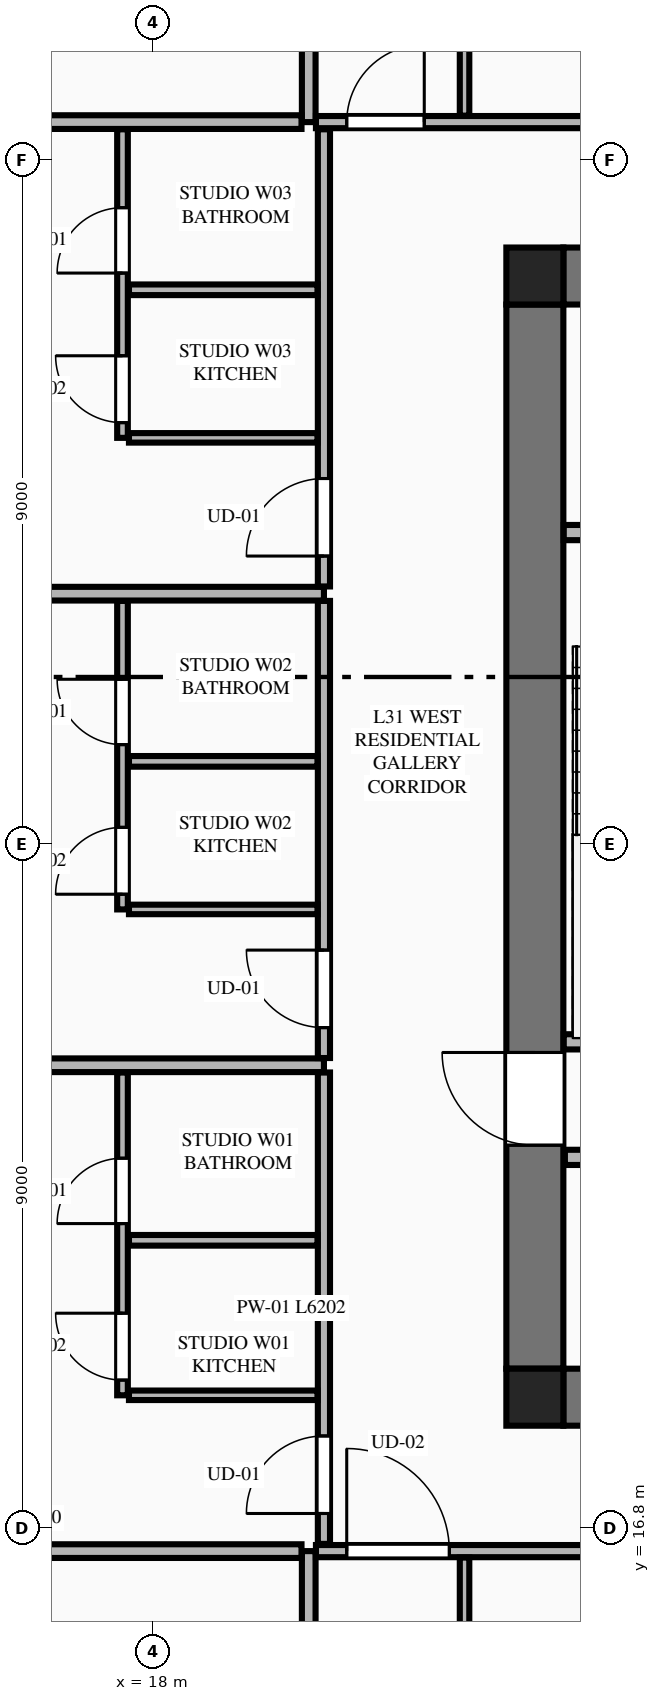
"""IFC4 building model, lengths in metres.
Left out: names, types, materials, properties, quantities, classifications, styles, units other than length and angle.
Written with IfcOpenShell. Run it as: python <this file> out.ifc"""

import sys

from ifc_helpers import new_model, si_unit, direction, frame, frame_2d, origin, origin_2d, place, context, subcontext, project, spatial, rectangle, extrude, element, fill, save


model = new_model("IFC4")
c1 = context("Model", 3, precision=1e-05, world=origin(), true_north=direction((0.0, 1.0)))
c2 = subcontext(c1, "Body", "Model", "MODEL_VIEW")
j1 = project(units=[si_unit("LENGTHUNIT", "METRE"), si_unit("PLANEANGLEUNIT", "RADIAN")], contexts=[c1])
p1 = place(None, origin())
s1 = spatial("IfcSite", under=j1, at=p1, CompositionType="ELEMENT")
p2 = place(p1, origin())
s2 = spatial("IfcBuilding", under=s1, at=p2, CompositionType="ELEMENT")
p3 = place(p2, frame((0.0, 0.0, 119.7)))
s3 = spatial("IfcBuildingStorey", under=s2, at=p3, CompositionType="ELEMENT", Elevation=119.7)
for number, where, z_axis, x_axis in (
    (1, (23.025, 18.525, 0.0), (0.0, 0.0, 1.0), (1.0, 0.0, 0.0)),
    (2, (23.025, 33.275, 0.0), (0.0, 0.0, 1.0), (1.0, 0.0, 0.0)),
):
    element("IfcColumn", number, at=place(p3, frame(where, z_axis=z_axis, x_axis=x_axis)), inside=s3, PredefinedType="COLUMN", context=c2, shape_type="SweptSolid", body=[
        extrude(rectangle(XDim=0.75, YDim=0.75, at=origin_2d()), origin(), (0.0, 0.0, 1.0), 3.55),
    ])
for number, where, z_axis, x_axis in (
    (3, (23.4, 18.525, 0.0), (0.0, 0.0, 1.0), (1.0, 0.0, 0.0)),
    (4, (23.4, 33.275, 0.0), (0.0, 0.0, 1.0), (1.0, 0.0, 0.0)),
):
    element("IfcWall", number, at=place(p3, frame(where, z_axis=z_axis, x_axis=x_axis)), inside=s3, PredefinedType="SHEAR", context=c2, shape_type="SweptSolid", body=[
        extrude(rectangle(XDim=18.0, YDim=0.75, at=frame_2d((9.0, 0.0))), origin(), (0.0, 0.0, 1.0), 3.34),
    ])
p4 = place(p3, frame((23.025, 18.9, 0.0), z_axis=(0.0, 0.0, 1.0), x_axis=(0.0, 1.0, 0.0)))
e5 = element("IfcWall", 5, at=p4, inside=s3, PredefinedType="SHEAR", context=c2, shape_type="SweptSolid", body=[
    extrude(rectangle(XDim=14.0, YDim=0.75, at=frame_2d((7.0, 0.0))), origin(), (0.0, 0.0, 1.0), 3.34),
])
p5 = place(p4, frame((2.94, 0.0, 0.0)))
e6 = element("IfcOpeningElement", 6, at=p5, cuts=e5, PredefinedType="OPENING", context=c2, shape_type="SweptSolid", body=[
    extrude(rectangle(XDim=1.22, YDim=2.25, at=frame_2d((0.61, 1.125))), frame((0.0, 0.385, 0.0), z_axis=(0.0, -1.0, 0.0), x_axis=(1.0, 0.0, 0.0)), (0.0, 0.0, 1.0), 0.77),
])
p6 = place(p3, frame((23.405, 23.2, 0.0), z_axis=(0.0, 0.0, 1.0), x_axis=(1.0, 0.0, 0.0)))
e7 = element("IfcWall", 7, at=p6, inside=s3, PredefinedType="PLUMBINGWALL", context=c2, shape_type="SweptSolid", body=[
    extrude(rectangle(XDim=3.27, YDim=0.2, at=frame_2d((1.635, 0.0))), origin(), (0.0, 0.0, 1.0), 3.34),
])
p7 = place(p3, frame((23.405, 29.9, 0.0), z_axis=(0.0, 0.0, 1.0), x_axis=(1.0, 0.0, 0.0)))
e8 = element("IfcWall", 8, at=p7, inside=s3, PredefinedType="PLUMBINGWALL", context=c2, shape_type="SweptSolid", body=[
    extrude(rectangle(XDim=3.27, YDim=0.2, at=frame_2d((1.635, 0.0))), origin(), (0.0, 0.0, 1.0), 3.34),
])
p8 = place(p7, frame((1.85, 0.0, 0.0)))
e9 = element("IfcOpeningElement", 9, at=p8, cuts=e8, PredefinedType="OPENING", context=c2, shape_type="SweptSolid", body=[
    extrude(rectangle(XDim=0.85, YDim=2.05, at=frame_2d((0.425, 1.025))), frame((0.0, 0.11, 0.0), z_axis=(0.0, -1.0, 0.0), x_axis=(1.0, 0.0, 0.0)), (0.0, 0.0, 1.0), 0.22),
])
p9 = place(p3, frame((23.42, 21.68, 0.0), z_axis=(0.0, 0.0, 1.0), x_axis=(1.0, 0.0, 0.0)))
e10 = element("IfcWall", 10, at=p9, inside=s3, PredefinedType="PLUMBINGWALL", context=c2, shape_type="SweptSolid", body=[
    extrude(rectangle(XDim=17.96, YDim=0.2, at=frame_2d((8.98, 0.0))), origin(), (0.0, 0.0, 1.0), 3.34),
])
p10 = place(p9, frame((11.6, 0.0, 0.0)))
e11 = element("IfcOpeningElement", 11, at=p10, cuts=e10, PredefinedType="OPENING", context=c2, shape_type="SweptSolid", body=[
    extrude(rectangle(XDim=1.1, YDim=2.2, at=frame_2d((0.55, 1.1))), frame((0.0, 0.11, 0.0), z_axis=(0.0, -1.0, 0.0), x_axis=(1.0, 0.0, 0.0)), (0.0, 0.0, 1.0), 0.22),
])
p11 = place(p9, frame((0.41, 0.0, 0.0)))
e12 = element("IfcOpeningElement", 12, at=p11, cuts=e10, PredefinedType="OPENING", context=c2, shape_type="SweptSolid", body=[
    extrude(rectangle(XDim=0.85, YDim=2.05, at=frame_2d((0.425, 1.025))), frame((0.0, 0.11, 0.0), z_axis=(0.0, -1.0, 0.0), x_axis=(1.0, 0.0, 0.0)), (0.0, 0.0, 1.0), 0.22),
])
p12 = place(p9, frame((4.13, 0.0, 0.0)))
e13 = element("IfcOpeningElement", 13, at=p12, cuts=e10, PredefinedType="OPENING", context=c2, shape_type="SweptSolid", body=[
    extrude(rectangle(XDim=0.85, YDim=2.05, at=frame_2d((0.425, 1.025))), frame((0.0, 0.11, 0.0), z_axis=(0.0, -1.0, 0.0), x_axis=(1.0, 0.0, 0.0)), (0.0, 0.0, 1.0), 0.22),
])
p13 = place(p9, frame((7.83, 0.0, 0.0)))
e14 = element("IfcOpeningElement", 14, at=p13, cuts=e10, PredefinedType="OPENING", context=c2, shape_type="SweptSolid", body=[
    extrude(rectangle(XDim=0.85, YDim=2.05, at=frame_2d((0.425, 1.025))), frame((0.0, 0.11, 0.0), z_axis=(0.0, -1.0, 0.0), x_axis=(1.0, 0.0, 0.0)), (0.0, 0.0, 1.0), 0.22),
])
p14 = place(p9, frame((13.78, 0.0, 0.0)))
e15 = element("IfcOpeningElement", 15, at=p14, cuts=e10, PredefinedType="OPENING", context=c2, shape_type="SweptSolid", body=[
    extrude(rectangle(XDim=0.85, YDim=2.05, at=frame_2d((0.425, 1.025))), frame((0.0, 0.11, 0.0), z_axis=(0.0, -1.0, 0.0), x_axis=(1.0, 0.0, 0.0)), (0.0, 0.0, 1.0), 0.22),
])
p15 = place(p9, frame((16.13, 0.0, 0.0)))
e16 = element("IfcOpeningElement", 16, at=p15, cuts=e10, PredefinedType="OPENING", context=c2, shape_type="SweptSolid", body=[
    extrude(rectangle(XDim=0.85, YDim=2.05, at=frame_2d((0.425, 1.025))), frame((0.0, 0.11, 0.0), z_axis=(0.0, -1.0, 0.0), x_axis=(1.0, 0.0, 0.0)), (0.0, 0.0, 1.0), 0.22),
])
p16 = place(p3, frame((20.05, 4.105, 0.0), z_axis=(0.0, 0.0, 1.0), x_axis=(0.0, 1.0, 0.0)))
e17 = element("IfcWall", 17, at=p16, inside=s3, PredefinedType="PARTITIONING", context=c2, shape_type="SweptSolid", body=[
    extrude(rectangle(XDim=12.395, YDim=0.18, at=frame_2d((6.198, 0.0))), origin(), (0.0, 0.0, 1.0), 3.34),
])
p17 = place(p3, frame((20.145, 16.5, 0.0), z_axis=(0.0, 0.0, 1.0), x_axis=(1.0, 0.0, 0.0)))
e18 = element("IfcWall", 18, at=p17, inside=s3, PredefinedType="PARTITIONING", context=c2, shape_type="SweptSolid", body=[
    extrude(rectangle(XDim=24.51, YDim=0.16, at=frame_2d((12.255, 0.0))), origin(), (0.0, 0.0, 1.0), 3.34),
])
p18 = place(p17, frame((0.405, 0.0, 0.0)))
e19 = element("IfcOpeningElement", 19, at=p18, cuts=e18, PredefinedType="OPENING", context=c2, shape_type="SweptSolid", body=[
    extrude(rectangle(XDim=1.35, YDim=2.35, at=frame_2d((0.675, 1.175))), frame((0.0, 0.09, 0.0), z_axis=(0.0, -1.0, 0.0), x_axis=(1.0, 0.0, 0.0)), (0.0, 0.0, 1.0), 0.18),
])
p19 = place(p3, frame((22.1, 10.284, 0.0), z_axis=(0.0, 0.0, 1.0), x_axis=(0.0, 1.0, 0.0)))
e20 = element("IfcWall", 20, at=p19, inside=s3, PredefinedType="PARTITIONING", context=c2, shape_type="SweptSolid", body=[
    extrude(rectangle(XDim=6.131, YDim=0.125, at=frame_2d((3.065, 0.0))), origin(), (0.0, 0.0, 1.0), 2.722),
])
p20 = place(p3, frame((20.05, 35.3, 0.0), z_axis=(0.0, 0.0, 1.0), x_axis=(0.0, 1.0, 0.0)))
e21 = element("IfcWall", 21, at=p20, inside=s3, PredefinedType="PARTITIONING", context=c2, shape_type="SweptSolid", body=[
    extrude(rectangle(XDim=12.195, YDim=0.18, at=frame_2d((6.098, 0.0))), origin(), (0.0, 0.0, 1.0), 3.34),
])
p21 = place(p3, frame((20.145, 35.3, 0.0), z_axis=(0.0, 0.0, 1.0), x_axis=(1.0, 0.0, 0.0)))
e22 = element("IfcWall", 22, at=p21, inside=s3, PredefinedType="PARTITIONING", context=c2, shape_type="SweptSolid", body=[
    extrude(rectangle(XDim=24.51, YDim=0.16, at=frame_2d((12.255, 0.0))), origin(), (0.0, 0.0, 1.0), 3.34),
])
p22 = place(p21, frame((0.405, 0.0, 0.0)))
e23 = element("IfcOpeningElement", 23, at=p22, cuts=e22, PredefinedType="OPENING", context=c2, shape_type="SweptSolid", body=[
    extrude(rectangle(XDim=1.02, YDim=2.25, at=frame_2d((0.51, 1.125))), frame((0.0, 0.09, 0.0), z_axis=(0.0, -1.0, 0.0), x_axis=(1.0, 0.0, 0.0)), (0.0, 0.0, 1.0), 0.18),
])
p23 = place(p3, frame((22.1, 35.385, 0.0), z_axis=(0.0, 0.0, 1.0), x_axis=(0.0, 1.0, 0.0)))
e24 = element("IfcWall", 24, at=p23, inside=s3, PredefinedType="PARTITIONING", context=c2, shape_type="SweptSolid", body=[
    extrude(rectangle(XDim=3.956, YDim=0.125, at=frame_2d((1.978, 0.0))), origin(), (0.0, 0.0, 1.0), 2.722),
])
p24 = place(p3, frame((12.185, 16.5, 0.0), z_axis=(0.0, 0.0, 1.0), x_axis=(1.0, 0.0, 0.0)))
e25 = element("IfcWall", 25, at=p24, inside=s3, PredefinedType="PARTITIONING", context=c2, shape_type="SweptSolid", body=[
    extrude(rectangle(XDim=7.77, YDim=0.18, at=frame_2d((3.885, 0.0))), origin(), (0.0, 0.0, 1.0), 3.34),
])
p25 = place(p3, frame((12.286, 35.3, 0.0), z_axis=(0.0, 0.0, 1.0), x_axis=(1.0, 0.0, 0.0)))
e26 = element("IfcWall", 26, at=p25, inside=s3, PredefinedType="PARTITIONING", context=c2, shape_type="SweptSolid", body=[
    extrude(rectangle(XDim=7.669, YDim=0.18, at=frame_2d((3.834, 0.0))), origin(), (0.0, 0.0, 1.0), 3.34),
])
p26 = place(p3, frame((20.25, 16.595, 0.0), z_axis=(0.0, 0.0, 1.0), x_axis=(0.0, 1.0, 0.0)))
e27 = element("IfcWall", 27, at=p26, inside=s3, PredefinedType="PARTITIONING", context=c2, shape_type="SweptSolid", body=[
    extrude(rectangle(XDim=6.202, YDim=0.16, at=frame_2d((3.101, 0.0))), origin(), (0.0, 0.0, 1.0), 3.34),
])
p27 = place(p26, frame((0.4, 0.0, 0.0)))
e28 = element("IfcOpeningElement", 28, at=p27, cuts=e27, PredefinedType="OPENING", context=c2, shape_type="SweptSolid", body=[
    extrude(rectangle(XDim=1.02, YDim=2.25, at=frame_2d((0.51, 1.125))), frame((0.0, 0.09, 0.0), z_axis=(0.0, -1.0, 0.0), x_axis=(1.0, 0.0, 0.0)), (0.0, 0.0, 1.0), 0.18),
])
p28 = place(p3, frame((17.685, 18.55, 0.0), z_axis=(0.0, 0.0, 1.0), x_axis=(1.0, 0.0, 0.0)))
e29 = element("IfcWall", 29, at=p28, inside=s3, PredefinedType="PARTITIONING", context=c2, shape_type="SweptSolid", body=[
    extrude(rectangle(XDim=2.48, YDim=0.125, at=frame_2d((1.24, 0.0))), origin(), (0.0, 0.0, 1.0), 2.722),
])
p29 = place(p3, frame((17.6, 18.55, 0.0), z_axis=(0.0, 0.0, 1.0), x_axis=(0.0, 1.0, 0.0)))
e30 = element("IfcWall", 30, at=p29, inside=s3, PredefinedType="PLUMBINGWALL", context=c2, shape_type="SweptSolid", body=[
    extrude(rectangle(XDim=4.247, YDim=0.14, at=frame_2d((2.124, 0.0))), origin(), (0.0, 0.0, 1.0), 3.34),
])
p30 = place(p29, frame((2.259, 0.0, 0.0)))
e31 = element("IfcOpeningElement", 31, at=p30, cuts=e30, PredefinedType="OPENING", context=c2, shape_type="SweptSolid", body=[
    extrude(rectangle(XDim=0.86, YDim=2.1, at=frame_2d((0.43, 1.05))), frame((0.0, 0.08, 0.0), z_axis=(0.0, -1.0, 0.0), x_axis=(1.0, 0.0, 0.0)), (0.0, 0.0, 1.0), 0.16),
])
p31 = place(p29, frame((0.2, 0.0, 0.0)))
e32 = element("IfcOpeningElement", 32, at=p31, cuts=e30, PredefinedType="OPENING", context=c2, shape_type="SweptSolid", body=[
    extrude(rectangle(XDim=0.88, YDim=2.15, at=frame_2d((0.44, 1.075))), frame((0.0, 0.08, 0.0), z_axis=(0.0, -1.0, 0.0), x_axis=(1.0, 0.0, 0.0)), (0.0, 0.0, 1.0), 0.16),
])
p32 = place(p3, frame((17.685, 20.589, 0.0), z_axis=(0.0, 0.0, 1.0), x_axis=(1.0, 0.0, 0.0)))
e33 = element("IfcWall", 33, at=p32, inside=s3, PredefinedType="PLUMBINGWALL", context=c2, shape_type="SweptSolid", body=[
    extrude(rectangle(XDim=2.48, YDim=0.14, at=frame_2d((1.24, 0.0))), origin(), (0.0, 0.0, 1.0), 3.34),
])
p33 = place(p3, frame((8.951, 22.892, 0.0), z_axis=(0.0, 0.0, 1.0), x_axis=(1.0, 0.0, 0.0)))
e34 = element("IfcWall", 34, at=p33, inside=s3, PredefinedType="PARTITIONING", context=c2, shape_type="SweptSolid", body=[
    extrude(rectangle(XDim=11.299, YDim=0.18, at=frame_2d((5.649, 0.0))), origin(), (0.0, 0.0, 1.0), 3.34),
])
p34 = place(p3, frame((20.25, 22.987, 0.0), z_axis=(0.0, 0.0, 1.0), x_axis=(0.0, 1.0, 0.0)))
e35 = element("IfcWall", 35, at=p34, inside=s3, PredefinedType="PARTITIONING", context=c2, shape_type="SweptSolid", body=[
    extrude(rectangle(XDim=6.014, YDim=0.16, at=frame_2d((3.007, 0.0))), origin(), (0.0, 0.0, 1.0), 3.34),
])
p35 = place(p34, frame((0.4, 0.0, 0.0)))
e36 = element("IfcOpeningElement", 36, at=p35, cuts=e35, PredefinedType="OPENING", context=c2, shape_type="SweptSolid", body=[
    extrude(rectangle(XDim=1.02, YDim=2.25, at=frame_2d((0.51, 1.125))), frame((0.0, 0.09, 0.0), z_axis=(0.0, -1.0, 0.0), x_axis=(1.0, 0.0, 0.0)), (0.0, 0.0, 1.0), 0.18),
])
p36 = place(p3, frame((17.685, 24.942, 0.0), z_axis=(0.0, 0.0, 1.0), x_axis=(1.0, 0.0, 0.0)))
e37 = element("IfcWall", 37, at=p36, inside=s3, PredefinedType="PARTITIONING", context=c2, shape_type="SweptSolid", body=[
    extrude(rectangle(XDim=2.48, YDim=0.125, at=frame_2d((1.24, 0.0))), origin(), (0.0, 0.0, 1.0), 3.34),
])
p37 = place(p3, frame((17.6, 24.942, 0.0), z_axis=(0.0, 0.0, 1.0), x_axis=(0.0, 1.0, 0.0)))
e38 = element("IfcWall", 38, at=p37, inside=s3, PredefinedType="PLUMBINGWALL", context=c2, shape_type="SweptSolid", body=[
    extrude(rectangle(XDim=4.059, YDim=0.14, at=frame_2d((2.03, 0.0))), origin(), (0.0, 0.0, 1.0), 3.34),
])
p38 = place(p37, frame((2.168, 0.0, 0.0)))
e39 = element("IfcOpeningElement", 39, at=p38, cuts=e38, PredefinedType="OPENING", context=c2, shape_type="SweptSolid", body=[
    extrude(rectangle(XDim=0.86, YDim=2.1, at=frame_2d((0.43, 1.05))), frame((0.0, 0.08, 0.0), z_axis=(0.0, -1.0, 0.0), x_axis=(1.0, 0.0, 0.0)), (0.0, 0.0, 1.0), 0.16),
])
p39 = place(p37, frame((0.2, 0.0, 0.0)))
e40 = element("IfcOpeningElement", 40, at=p39, cuts=e38, PredefinedType="OPENING", context=c2, shape_type="SweptSolid", body=[
    extrude(rectangle(XDim=0.88, YDim=2.15, at=frame_2d((0.44, 1.075))), frame((0.0, 0.08, 0.0), z_axis=(0.0, -1.0, 0.0), x_axis=(1.0, 0.0, 0.0)), (0.0, 0.0, 1.0), 0.16),
])
p40 = place(p3, frame((17.685, 26.89, 0.0), z_axis=(0.0, 0.0, 1.0), x_axis=(1.0, 0.0, 0.0)))
e41 = element("IfcWall", 41, at=p40, inside=s3, PredefinedType="PLUMBINGWALL", context=c2, shape_type="SweptSolid", body=[
    extrude(rectangle(XDim=2.48, YDim=0.14, at=frame_2d((1.24, 0.0))), origin(), (0.0, 0.0, 1.0), 3.34),
])
p41 = place(p3, frame((9.147, 29.096, 0.0), z_axis=(0.0, 0.0, 1.0), x_axis=(1.0, 0.0, 0.0)))
e42 = element("IfcWall", 42, at=p41, inside=s3, PredefinedType="PARTITIONING", context=c2, shape_type="SweptSolid", body=[
    extrude(rectangle(XDim=11.103, YDim=0.18, at=frame_2d((5.552, 0.0))), origin(), (0.0, 0.0, 1.0), 3.34),
])
p42 = place(p3, frame((20.25, 29.191, 0.0), z_axis=(0.0, 0.0, 1.0), x_axis=(0.0, 1.0, 0.0)))
e43 = element("IfcWall", 43, at=p42, inside=s3, PredefinedType="PARTITIONING", context=c2, shape_type="SweptSolid", body=[
    extrude(rectangle(XDim=6.014, YDim=0.16, at=frame_2d((3.007, 0.0))), origin(), (0.0, 0.0, 1.0), 3.34),
])
p43 = place(p42, frame((0.4, 0.0, 0.0)))
e44 = element("IfcOpeningElement", 44, at=p43, cuts=e43, PredefinedType="OPENING", context=c2, shape_type="SweptSolid", body=[
    extrude(rectangle(XDim=1.02, YDim=2.25, at=frame_2d((0.51, 1.125))), frame((0.0, 0.09, 0.0), z_axis=(0.0, -1.0, 0.0), x_axis=(1.0, 0.0, 0.0)), (0.0, 0.0, 1.0), 0.18),
])
p44 = place(p3, frame((17.685, 31.146, 0.0), z_axis=(0.0, 0.0, 1.0), x_axis=(1.0, 0.0, 0.0)))
e45 = element("IfcWall", 45, at=p44, inside=s3, PredefinedType="PARTITIONING", context=c2, shape_type="SweptSolid", body=[
    extrude(rectangle(XDim=2.48, YDim=0.125, at=frame_2d((1.24, 0.0))), origin(), (0.0, 0.0, 1.0), 3.34),
])
p45 = place(p3, frame((17.6, 31.146, 0.0), z_axis=(0.0, 0.0, 1.0), x_axis=(0.0, 1.0, 0.0)))
e46 = element("IfcWall", 46, at=p45, inside=s3, PredefinedType="PLUMBINGWALL", context=c2, shape_type="SweptSolid", body=[
    extrude(rectangle(XDim=4.059, YDim=0.14, at=frame_2d((2.03, 0.0))), origin(), (0.0, 0.0, 1.0), 3.34),
])
p46 = place(p45, frame((2.168, 0.0, 0.0)))
e47 = element("IfcOpeningElement", 47, at=p46, cuts=e46, PredefinedType="OPENING", context=c2, shape_type="SweptSolid", body=[
    extrude(rectangle(XDim=0.86, YDim=2.1, at=frame_2d((0.43, 1.05))), frame((0.0, 0.08, 0.0), z_axis=(0.0, -1.0, 0.0), x_axis=(1.0, 0.0, 0.0)), (0.0, 0.0, 1.0), 0.16),
])
p47 = place(p45, frame((0.2, 0.0, 0.0)))
e48 = element("IfcOpeningElement", 48, at=p47, cuts=e46, PredefinedType="OPENING", context=c2, shape_type="SweptSolid", body=[
    extrude(rectangle(XDim=0.88, YDim=2.15, at=frame_2d((0.44, 1.075))), frame((0.0, 0.08, 0.0), z_axis=(0.0, -1.0, 0.0), x_axis=(1.0, 0.0, 0.0)), (0.0, 0.0, 1.0), 0.16),
])
p48 = place(p3, frame((17.685, 33.094, 0.0), z_axis=(0.0, 0.0, 1.0), x_axis=(1.0, 0.0, 0.0)))
e49 = element("IfcWall", 49, at=p48, inside=s3, PredefinedType="PLUMBINGWALL", context=c2, shape_type="SweptSolid", body=[
    extrude(rectangle(XDim=2.48, YDim=0.14, at=frame_2d((1.24, 0.0))), origin(), (0.0, 0.0, 1.0), 3.34),
])
p49 = place(p5, origin())
e50 = element("IfcDoor", 50, at=p49, inside=s3, OperationType="SINGLE_SWING_RIGHT", PredefinedType="DOOR", context=c2, shape_type="SweptSolid", body=[
    extrude(rectangle(XDim=1.22, YDim=2.25, at=frame_2d((0.61, 1.125))), frame((0.0, 0.025, 0.0), z_axis=(0.0, -1.0, 0.0), x_axis=(1.0, 0.0, 0.0)), (0.0, 0.0, 1.0), 0.05),
])
fill(e6, e50)
p50 = place(p18, origin())
e51 = element("IfcDoor", 51, at=p50, inside=s3, OperationType="SINGLE_SWING_LEFT", PredefinedType="DOOR", context=c2, shape_type="SweptSolid", body=[
    extrude(rectangle(XDim=1.35, YDim=2.35, at=frame_2d((0.675, 1.175))), frame((0.0, 0.025, 0.0), z_axis=(0.0, -1.0, 0.0), x_axis=(1.0, 0.0, 0.0)), (0.0, 0.0, 1.0), 0.05),
])
fill(e19, e51)
p51 = place(p22, origin())
e52 = element("IfcDoor", 52, at=p51, inside=s3, OperationType="SINGLE_SWING_RIGHT", PredefinedType="DOOR", context=c2, shape_type="SweptSolid", body=[
    extrude(rectangle(XDim=1.02, YDim=2.25, at=frame_2d((0.51, 1.125))), frame((0.0, 0.025, 0.0), z_axis=(0.0, -1.0, 0.0), x_axis=(1.0, 0.0, 0.0)), (0.0, 0.0, 1.0), 0.05),
])
fill(e23, e52)
p52 = place(p30, origin())
e53 = element("IfcDoor", 53, at=p52, inside=s3, OperationType="SINGLE_SWING_LEFT", PredefinedType="DOOR", context=c2, shape_type="SweptSolid", body=[
    extrude(rectangle(XDim=0.86, YDim=2.1, at=frame_2d((0.43, 1.05))), frame((0.0, 0.025, 0.0), z_axis=(0.0, -1.0, 0.0), x_axis=(1.0, 0.0, 0.0)), (0.0, 0.0, 1.0), 0.05),
])
fill(e31, e53)
p53 = place(p27, origin())
e54 = element("IfcDoor", 54, at=p53, inside=s3, OperationType="SINGLE_SWING_LEFT", PredefinedType="DOOR", context=c2, shape_type="SweptSolid", body=[
    extrude(rectangle(XDim=1.02, YDim=2.25, at=frame_2d((0.51, 1.125))), frame((0.0, 0.025, 0.0), z_axis=(0.0, -1.0, 0.0), x_axis=(1.0, 0.0, 0.0)), (0.0, 0.0, 1.0), 0.05),
])
fill(e28, e54)
p54 = place(p31, origin())
e55 = element("IfcDoor", 55, at=p54, inside=s3, OperationType="SINGLE_SWING_RIGHT", PredefinedType="DOOR", context=c2, shape_type="SweptSolid", body=[
    extrude(rectangle(XDim=0.88, YDim=2.15, at=frame_2d((0.44, 1.075))), frame((0.0, 0.025, 0.0), z_axis=(0.0, -1.0, 0.0), x_axis=(1.0, 0.0, 0.0)), (0.0, 0.0, 1.0), 0.05),
])
fill(e32, e55)
p55 = place(p38, origin())
e56 = element("IfcDoor", 56, at=p55, inside=s3, OperationType="SINGLE_SWING_RIGHT", PredefinedType="DOOR", context=c2, shape_type="SweptSolid", body=[
    extrude(rectangle(XDim=0.86, YDim=2.1, at=frame_2d((0.43, 1.05))), frame((0.0, 0.025, 0.0), z_axis=(0.0, -1.0, 0.0), x_axis=(1.0, 0.0, 0.0)), (0.0, 0.0, 1.0), 0.05),
])
fill(e39, e56)
p56 = place(p35, origin())
e57 = element("IfcDoor", 57, at=p56, inside=s3, OperationType="SINGLE_SWING_RIGHT", PredefinedType="DOOR", context=c2, shape_type="SweptSolid", body=[
    extrude(rectangle(XDim=1.02, YDim=2.25, at=frame_2d((0.51, 1.125))), frame((0.0, 0.025, 0.0), z_axis=(0.0, -1.0, 0.0), x_axis=(1.0, 0.0, 0.0)), (0.0, 0.0, 1.0), 0.05),
])
fill(e36, e57)
p57 = place(p39, origin())
e58 = element("IfcDoor", 58, at=p57, inside=s3, OperationType="SINGLE_SWING_LEFT", PredefinedType="DOOR", context=c2, shape_type="SweptSolid", body=[
    extrude(rectangle(XDim=0.88, YDim=2.15, at=frame_2d((0.44, 1.075))), frame((0.0, 0.025, 0.0), z_axis=(0.0, -1.0, 0.0), x_axis=(1.0, 0.0, 0.0)), (0.0, 0.0, 1.0), 0.05),
])
fill(e40, e58)
p58 = place(p46, origin())
e59 = element("IfcDoor", 59, at=p58, inside=s3, OperationType="SINGLE_SWING_LEFT", PredefinedType="DOOR", context=c2, shape_type="SweptSolid", body=[
    extrude(rectangle(XDim=0.86, YDim=2.1, at=frame_2d((0.43, 1.05))), frame((0.0, 0.025, 0.0), z_axis=(0.0, -1.0, 0.0), x_axis=(1.0, 0.0, 0.0)), (0.0, 0.0, 1.0), 0.05),
])
fill(e47, e59)
p59 = place(p43, origin())
e60 = element("IfcDoor", 60, at=p59, inside=s3, OperationType="SINGLE_SWING_LEFT", PredefinedType="DOOR", context=c2, shape_type="SweptSolid", body=[
    extrude(rectangle(XDim=1.02, YDim=2.25, at=frame_2d((0.51, 1.125))), frame((0.0, 0.025, 0.0), z_axis=(0.0, -1.0, 0.0), x_axis=(1.0, 0.0, 0.0)), (0.0, 0.0, 1.0), 0.05),
])
fill(e44, e60)
p60 = place(p47, origin())
e61 = element("IfcDoor", 61, at=p60, inside=s3, OperationType="SINGLE_SWING_RIGHT", PredefinedType="DOOR", context=c2, shape_type="SweptSolid", body=[
    extrude(rectangle(XDim=0.88, YDim=2.15, at=frame_2d((0.44, 1.075))), frame((0.0, 0.025, 0.0), z_axis=(0.0, -1.0, 0.0), x_axis=(1.0, 0.0, 0.0)), (0.0, 0.0, 1.0), 0.05),
])
fill(e48, e61)
save(model, sys.argv[1])
